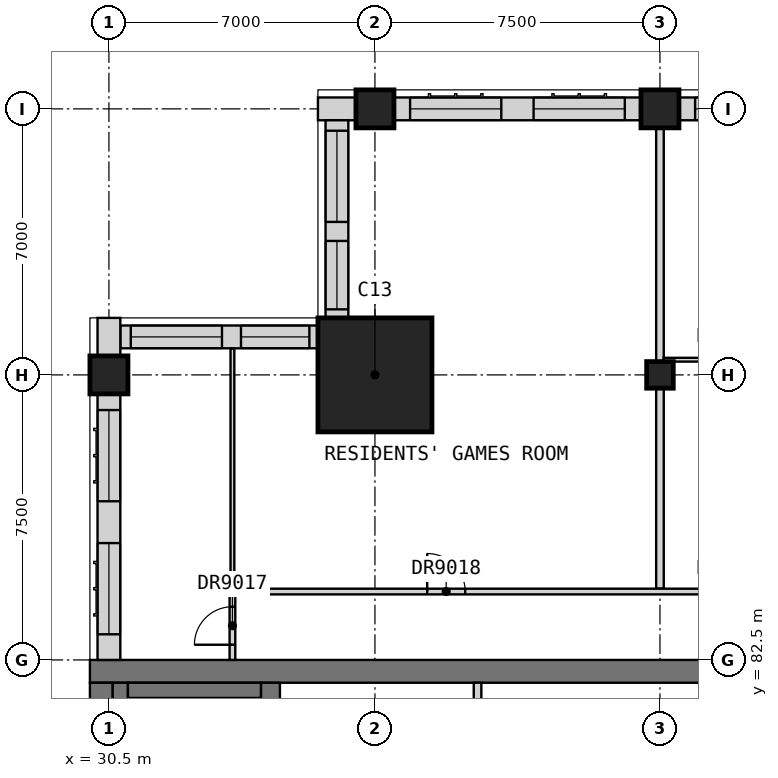
"""IFC4 building model, lengths in metres.
Left out: names, types, materials, properties, quantities, classifications, styles, units other than length and angle.
Written with IfcOpenShell. Run it as: python <this file> out.ifc"""

import sys

from ifc_helpers import new_model, si_unit, direction, frame, frame_2d, origin, origin_2d, place, context, subcontext, project, spatial, rectangle, extrude, element, fill, save


model = new_model("IFC4")
c1 = context("Model", 3, precision=1e-05, world=origin(), true_north=direction((0.0, 1.0)))
c2 = subcontext(c1, "Body", "Model", "MODEL_VIEW")
j1 = project(units=[si_unit("LENGTHUNIT", "METRE"), si_unit("PLANEANGLEUNIT", "RADIAN")], contexts=[c1])
p1 = place(None, origin())
s1 = spatial("IfcSite", under=j1, at=p1, CompositionType="ELEMENT")
p2 = place(p1, origin())
s2 = spatial("IfcBuilding", under=s1, at=p2, CompositionType="ELEMENT")
p3 = place(p2, frame((0.0, 0.0, 280.2)))
s3 = spatial("IfcBuildingStorey", under=s2, at=p3, CompositionType="ELEMENT", Elevation=280.2)
for number, where, z_axis, x_axis in (
    (1, (30.5, 90.0, 0.0), (0.0, 0.0, 1.0), (1.0, 0.0, 0.0)),
    (2, (37.5, 97.0, 0.0), (0.0, 0.0, 1.0), (1.0, 0.0, 0.0)),
):
    element("IfcColumn", number, at=place(p3, frame(where, z_axis=z_axis, x_axis=x_axis)), inside=s3, PredefinedType="COLUMN", context=c2, shape_type="SweptSolid", body=[
        extrude(rectangle(XDim=1.0, YDim=1.0, at=origin_2d()), origin(), (0.0, 0.0, 1.0), 3.5),
    ])
p4 = place(p3, frame((45.0, 90.0, 0.0), z_axis=(0.0, 0.0, 1.0), x_axis=(1.0, 0.0, 0.0)))
e3 = element("IfcColumn", 3, at=p4, inside=s3, PredefinedType="COLUMN", context=c2, shape_type="SweptSolid", body=[
    extrude(rectangle(XDim=0.7, YDim=0.7, at=origin_2d()), origin(), (0.0, 0.0, 1.0), 3.5),
])
p5 = place(p3, frame((45.0, 97.0, 0.0), z_axis=(0.0, 0.0, 1.0), x_axis=(1.0, 0.0, 0.0)))
e4 = element("IfcColumn", 4, at=p5, inside=s3, PredefinedType="COLUMN", context=c2, shape_type="SweptSolid", body=[
    extrude(rectangle(XDim=1.0, YDim=1.0, at=origin_2d()), origin(), (0.0, 0.0, 1.0), 3.5),
])
p6 = place(p3, frame((37.5, 90.0, 0.0), z_axis=(0.0, 0.0, 1.0), x_axis=(1.0, 0.0, 0.0)))
e5 = element("IfcColumn", 5, at=p6, inside=s3, PredefinedType="COLUMN", context=c2, shape_type="SweptSolid", body=[
    extrude(rectangle(XDim=3.0, YDim=3.0, at=origin_2d()), origin(), (0.0, 0.0, 1.0), 3.5),
])
p7 = place(p3, frame((30.0, 82.2, 0.0), z_axis=(0.0, 0.0, 1.0), x_axis=(1.0, 0.0, 0.0)))
e6 = element("IfcWall", 6, at=p7, inside=s3, PredefinedType="SHEAR", context=c2, shape_type="SweptSolid", body=[
    extrude(rectangle(XDim=30.0, YDim=0.6, at=frame_2d((15.0, 0.0))), origin(), (0.0, 0.0, 1.0), 3.5),
])
p8 = place(p3, frame((30.3, 60.6, 0.0), z_axis=(0.0, 0.0, 1.0), x_axis=(0.0, 1.0, 0.0)))
e7 = element("IfcWall", 7, at=p8, inside=s3, PredefinedType="SHEAR", context=c2, shape_type="SweptSolid", body=[
    extrude(rectangle(XDim=21.3, YDim=0.6, at=frame_2d((10.65, 0.0))), origin(), (0.0, 0.0, 1.0), 3.5),
])
p9 = place(p3, frame((34.75, 78.3, 0.0), z_axis=(0.0, 0.0, 1.0), x_axis=(0.0, 1.0, 0.0)))
e8 = element("IfcWall", 8, at=p9, inside=s3, PredefinedType="SHEAR", context=c2, shape_type="SweptSolid", body=[
    extrude(rectangle(XDim=3.6, YDim=0.5, at=frame_2d((1.8, 0.0))), origin(), (0.0, 0.0, 1.0), 3.5),
])
p10 = place(p3, frame((52.0, 97.0, 0.0), z_axis=(0.0, 0.0, 1.0), x_axis=(-1.0, 0.0, 0.0)))
e9 = element("IfcWall", 9, at=p10, inside=s3, PredefinedType="SOLIDWALL", context=c2, shape_type="SweptSolid", body=[
    extrude(rectangle(XDim=6.5, YDim=0.6, at=frame_2d((3.25, 0.0))), origin(), (0.0, 0.0, 1.0), 2.75),
])
p11 = place(p10, frame((3.675, 0.0, 0.8)))
e10 = element("IfcOpeningElement", 10, at=p11, cuts=e9, PredefinedType="OPENING", context=c2, shape_type="SweptSolid", body=[
    extrude(rectangle(XDim=2.4, YDim=1.8, at=frame_2d((1.2, 0.9))), frame((0.0, 0.31, 0.0), z_axis=(0.0, -1.0, 0.0), x_axis=(1.0, 0.0, 0.0)), (0.0, 0.0, 1.0), 0.62),
])
p12 = place(p10, frame((0.425, 0.0, 0.8)))
e11 = element("IfcOpeningElement", 11, at=p12, cuts=e9, PredefinedType="OPENING", context=c2, shape_type="SweptSolid", body=[
    extrude(rectangle(XDim=2.4, YDim=1.8, at=frame_2d((1.2, 0.9))), frame((0.0, 0.31, 0.0), z_axis=(0.0, -1.0, 0.0), x_axis=(1.0, 0.0, 0.0)), (0.0, 0.0, 1.0), 0.62),
])
p13 = place(p3, frame((44.5, 97.0, 0.0), z_axis=(0.0, 0.0, 1.0), x_axis=(-1.0, 0.0, 0.0)))
e12 = element("IfcWall", 12, at=p13, inside=s3, PredefinedType="SOLIDWALL", context=c2, shape_type="SweptSolid", body=[
    extrude(rectangle(XDim=6.5, YDim=0.6, at=frame_2d((3.25, 0.0))), origin(), (0.0, 0.0, 1.0), 2.75),
])
p14 = place(p13, frame((3.675, 0.0, 0.8)))
e13 = element("IfcOpeningElement", 13, at=p14, cuts=e12, PredefinedType="OPENING", context=c2, shape_type="SweptSolid", body=[
    extrude(rectangle(XDim=2.4, YDim=1.8, at=frame_2d((1.2, 0.9))), frame((0.0, 0.31, 0.0), z_axis=(0.0, -1.0, 0.0), x_axis=(1.0, 0.0, 0.0)), (0.0, 0.0, 1.0), 0.62),
])
p15 = place(p13, frame((0.425, 0.0, 0.8)))
e14 = element("IfcOpeningElement", 14, at=p15, cuts=e12, PredefinedType="OPENING", context=c2, shape_type="SweptSolid", body=[
    extrude(rectangle(XDim=2.4, YDim=1.8, at=frame_2d((1.2, 0.9))), frame((0.0, 0.31, 0.0), z_axis=(0.0, -1.0, 0.0), x_axis=(1.0, 0.0, 0.0)), (0.0, 0.0, 1.0), 0.62),
])
p16 = place(p3, frame((37.0, 97.0, 0.0), z_axis=(0.0, 0.0, 1.0), x_axis=(-1.0, 0.0, 0.0)))
e15 = element("IfcWall", 15, at=p16, inside=s3, PredefinedType="SOLIDWALL", context=c2, shape_type="SweptSolid", body=[
    extrude(rectangle(XDim=1.0, YDim=0.6, at=frame_2d((0.5, 0.0))), origin(), (0.0, 0.0, 1.0), 3.25),
])
p17 = place(p3, frame((36.5, 96.7, 0.0), z_axis=(0.0, 0.0, 1.0), x_axis=(0.0, -1.0, 0.0)))
e16 = element("IfcWall", 16, at=p17, inside=s3, PredefinedType="SOLIDWALL", context=c2, shape_type="SweptSolid", body=[
    extrude(rectangle(XDim=5.2, YDim=0.6, at=frame_2d((2.6, 0.0))), origin(), (0.0, 0.0, 1.0), 3.25),
])
p18 = place(p17, frame((3.175, 0.0, 0.8)))
e17 = element("IfcOpeningElement", 17, at=p18, cuts=e16, PredefinedType="OPENING", context=c2, shape_type="SweptSolid", body=[
    extrude(rectangle(XDim=1.8, YDim=1.8, at=frame_2d((0.9, 0.9))), frame((0.0, 0.31, 0.0), z_axis=(0.0, -1.0, 0.0), x_axis=(1.0, 0.0, 0.0)), (0.0, 0.0, 1.0), 0.62),
])
p19 = place(p17, frame((0.275, 0.0, 0.8)))
e18 = element("IfcOpeningElement", 18, at=p19, cuts=e16, PredefinedType="OPENING", context=c2, shape_type="SweptSolid", body=[
    extrude(rectangle(XDim=2.4, YDim=1.8, at=frame_2d((1.2, 0.9))), frame((0.0, 0.31, 0.0), z_axis=(0.0, -1.0, 0.0), x_axis=(1.0, 0.0, 0.0)), (0.0, 0.0, 1.0), 0.62),
])
p20 = place(p3, frame((36.0, 91.0, 0.0), z_axis=(0.0, 0.0, 1.0), x_axis=(-1.0, 0.0, 0.0)))
e19 = element("IfcWall", 19, at=p20, inside=s3, PredefinedType="SOLIDWALL", context=c2, shape_type="SweptSolid", body=[
    extrude(rectangle(XDim=5.2, YDim=0.6, at=frame_2d((2.6, 0.0))), origin(), (0.0, 0.0, 1.0), 3.25),
])
p21 = place(p20, frame((2.525, 0.0, 0.8)))
e20 = element("IfcOpeningElement", 20, at=p21, cuts=e19, PredefinedType="OPENING", context=c2, shape_type="SweptSolid", body=[
    extrude(rectangle(XDim=2.4, YDim=1.8, at=frame_2d((1.2, 0.9))), frame((0.0, 0.31, 0.0), z_axis=(0.0, -1.0, 0.0), x_axis=(1.0, 0.0, 0.0)), (0.0, 0.0, 1.0), 0.62),
])
p22 = place(p20, frame((0.225, 0.0, 0.8)))
e21 = element("IfcOpeningElement", 21, at=p22, cuts=e19, PredefinedType="OPENING", context=c2, shape_type="SweptSolid", body=[
    extrude(rectangle(XDim=1.8, YDim=1.8, at=frame_2d((0.9, 0.9))), frame((0.0, 0.31, 0.0), z_axis=(0.0, -1.0, 0.0), x_axis=(1.0, 0.0, 0.0)), (0.0, 0.0, 1.0), 0.62),
])
p23 = place(p3, frame((30.5, 91.5, 0.0), z_axis=(0.0, 0.0, 1.0), x_axis=(0.0, -1.0, 0.0)))
e22 = element("IfcWall", 22, at=p23, inside=s3, PredefinedType="SOLIDWALL", context=c2, shape_type="SweptSolid", body=[
    extrude(rectangle(XDim=1.0, YDim=0.6, at=frame_2d((0.5, 0.0))), origin(), (0.0, 0.0, 1.0), 3.25),
])
p24 = place(p3, frame((30.5, 89.5, 0.0), z_axis=(0.0, 0.0, 1.0), x_axis=(0.0, -1.0, 0.0)))
e23 = element("IfcWall", 23, at=p24, inside=s3, PredefinedType="SOLIDWALL", context=c2, shape_type="SweptSolid", body=[
    extrude(rectangle(XDim=7.0, YDim=0.6, at=frame_2d((3.5, 0.0))), origin(), (0.0, 0.0, 1.0), 3.25),
])
p25 = place(p24, frame((3.925, 0.0, 0.8)))
e24 = element("IfcOpeningElement", 24, at=p25, cuts=e23, PredefinedType="OPENING", context=c2, shape_type="SweptSolid", body=[
    extrude(rectangle(XDim=2.4, YDim=1.8, at=frame_2d((1.2, 0.9))), frame((0.0, 0.31, 0.0), z_axis=(0.0, -1.0, 0.0), x_axis=(1.0, 0.0, 0.0)), (0.0, 0.0, 1.0), 0.62),
])
p26 = place(p24, frame((0.425, 0.0, 0.8)))
e25 = element("IfcOpeningElement", 25, at=p26, cuts=e23, PredefinedType="OPENING", context=c2, shape_type="SweptSolid", body=[
    extrude(rectangle(XDim=2.4, YDim=1.8, at=frame_2d((1.2, 0.9))), frame((0.0, 0.31, 0.0), z_axis=(0.0, -1.0, 0.0), x_axis=(1.0, 0.0, 0.0)), (0.0, 0.0, 1.0), 0.62),
])
p27 = place(p3, frame((40.2, 78.5, 0.0), z_axis=(0.0, 0.0, 1.0), x_axis=(0.0, 1.0, 0.0)))
e26 = element("IfcWall", 26, at=p27, inside=s3, PredefinedType="SOLIDWALL", context=c2, shape_type="SweptSolid", body=[
    extrude(rectangle(XDim=3.4, YDim=0.2, at=frame_2d((1.7, 0.0))), origin(), (0.0, 0.0, 1.0), 3.5),
])
p28 = place(p3, frame((30.8, 60.6, 0.0), z_axis=(0.0, 0.0, 1.0), x_axis=(0.0, 1.0, 0.0)))
e27 = element("IfcWall", 27, at=p28, inside=s3, PredefinedType="SOLIDWALL", context=c2, shape_type="SweptSolid", body=[
    extrude(rectangle(XDim=21.3, YDim=0.4, at=frame_2d((10.65, 0.0))), origin(), (0.0, 0.0, 1.0), 3.25),
])
p29 = place(p3, frame((31.0, 81.7, 0.0), z_axis=(0.0, 0.0, 1.0), x_axis=(1.0, 0.0, 0.0)))
e28 = element("IfcWall", 28, at=p29, inside=s3, PredefinedType="SOLIDWALL", context=c2, shape_type="SweptSolid", body=[
    extrude(rectangle(XDim=3.5, YDim=0.4, at=frame_2d((1.75, 0.0))), origin(), (0.0, 0.0, 1.0), 3.25),
])
p30 = place(p3, frame((45.0, 84.375, 0.0), z_axis=(0.0, 0.0, 1.0), x_axis=(0.0, 1.0, 0.0)))
e29 = element("IfcWall", 29, at=p30, inside=s3, PredefinedType="PARTITIONING", context=c2, shape_type="SweptSolid", body=[
    extrude(rectangle(XDim=13.125, YDim=0.2, at=frame_2d((6.562, 0.0))), origin(), (0.0, 0.0, 1.0), 3.25),
])
p31 = place(p3, frame((33.75, 84.3, 0.0), z_axis=(0.0, 0.0, 1.0), x_axis=(1.0, 0.0, 0.0)))
e30 = element("IfcWall", 30, at=p31, inside=s3, PredefinedType="PARTITIONING", context=c2, shape_type="SweptSolid", body=[
    extrude(rectangle(XDim=28.05, YDim=0.15, at=frame_2d((14.025, 0.0))), origin(), (0.0, 0.0, 1.0), 3.25),
])
p32 = place(p31, frame((5.125, 0.0, 0.0)))
e31 = element("IfcOpeningElement", 31, at=p32, cuts=e30, PredefinedType="OPENING", context=c2, shape_type="SweptSolid", body=[
    extrude(rectangle(XDim=1.0, YDim=2.1, at=frame_2d((0.5, 1.05))), frame((0.0, 0.085, 0.0), z_axis=(0.0, -1.0, 0.0), x_axis=(1.0, 0.0, 0.0)), (0.0, 0.0, 1.0), 0.17),
])
p33 = place(p31, frame((12.675, 0.0, 0.0)))
e32 = element("IfcOpeningElement", 32, at=p33, cuts=e30, PredefinedType="OPENING", context=c2, shape_type="SweptSolid", body=[
    extrude(rectangle(XDim=0.9, YDim=2.1, at=frame_2d((0.45, 1.05))), frame((0.0, 0.085, 0.0), z_axis=(0.0, -1.0, 0.0), x_axis=(1.0, 0.0, 0.0)), (0.0, 0.0, 1.0), 0.17),
])
p34 = place(p31, frame((26.65, 0.0, 0.0)))
e33 = element("IfcOpeningElement", 33, at=p34, cuts=e30, PredefinedType="OPENING", context=c2, shape_type="SweptSolid", body=[
    extrude(rectangle(XDim=1.0, YDim=2.1, at=frame_2d((0.5, 1.05))), frame((0.0, 0.085, 0.0), z_axis=(0.0, -1.0, 0.0), x_axis=(1.0, 0.0, 0.0)), (0.0, 0.0, 1.0), 0.17),
])
p35 = place(p3, frame((33.75, 82.5, 0.0), z_axis=(0.0, 0.0, 1.0), x_axis=(0.0, 1.0, 0.0)))
e34 = element("IfcWall", 34, at=p35, inside=s3, PredefinedType="PARTITIONING", context=c2, shape_type="SweptSolid", body=[
    extrude(rectangle(XDim=1.725, YDim=0.15, at=frame_2d((0.863, 0.0))), origin(), (0.0, 0.0, 1.0), 3.25),
])
p36 = place(p35, frame((0.4, 0.0, 0.0)))
e35 = element("IfcOpeningElement", 35, at=p36, cuts=e34, PredefinedType="OPENING", context=c2, shape_type="SweptSolid", body=[
    extrude(rectangle(XDim=1.0, YDim=2.1, at=frame_2d((0.5, 1.05))), frame((0.0, 0.085, 0.0), z_axis=(0.0, -1.0, 0.0), x_axis=(1.0, 0.0, 0.0)), (0.0, 0.0, 1.0), 0.17),
])
p37 = place(p3, frame((45.1, 90.4, 0.0), z_axis=(0.0, 0.0, 1.0), x_axis=(1.0, 0.0, 0.0)))
e36 = element("IfcWall", 36, at=p37, inside=s3, PredefinedType="PARTITIONING", context=c2, shape_type="SweptSolid", body=[
    extrude(rectangle(XDim=14.8, YDim=0.1, at=frame_2d((7.4, 0.0))), origin(), (0.0, 0.0, 1.0), 3.25),
])
p38 = place(p37, frame((1.325, 0.0, 0.0)))
e37 = element("IfcOpeningElement", 37, at=p38, cuts=e36, PredefinedType="OPENING", context=c2, shape_type="SweptSolid", body=[
    extrude(rectangle(XDim=0.9, YDim=2.1, at=frame_2d((0.45, 1.05))), frame((0.0, 0.06, 0.0), z_axis=(0.0, -1.0, 0.0), x_axis=(1.0, 0.0, 0.0)), (0.0, 0.0, 1.0), 0.12),
])
p39 = place(p37, frame((8.825, 0.0, 0.0)))
e38 = element("IfcOpeningElement", 38, at=p39, cuts=e36, PredefinedType="OPENING", context=c2, shape_type="SweptSolid", body=[
    extrude(rectangle(XDim=0.9, YDim=2.1, at=frame_2d((0.45, 1.05))), frame((0.0, 0.06, 0.0), z_axis=(0.0, -1.0, 0.0), x_axis=(1.0, 0.0, 0.0)), (0.0, 0.0, 1.0), 0.12),
])
p40 = place(p37, frame((12.575, 0.0, 0.0)))
e39 = element("IfcOpeningElement", 39, at=p40, cuts=e36, PredefinedType="OPENING", context=c2, shape_type="SweptSolid", body=[
    extrude(rectangle(XDim=0.9, YDim=2.1, at=frame_2d((0.45, 1.05))), frame((0.0, 0.06, 0.0), z_axis=(0.0, -1.0, 0.0), x_axis=(1.0, 0.0, 0.0)), (0.0, 0.0, 1.0), 0.12),
])
p41 = place(p3, frame((33.75, 84.375, 0.0), z_axis=(0.0, 0.0, 1.0), x_axis=(0.0, 1.0, 0.0)))
e40 = element("IfcWall", 40, at=p41, inside=s3, PredefinedType="PARTITIONING", context=c2, shape_type="SweptSolid", body=[
    extrude(rectangle(XDim=6.315, YDim=0.1, at=frame_2d((3.157, 0.0))), origin(), (0.0, 0.0, 1.0), 3.25),
])
p42 = place(p11, origin())
e41 = element("IfcWindow", 41, at=p42, inside=s3, PartitioningType="SINGLE_PANEL", PredefinedType="WINDOW", context=c2, shape_type="SweptSolid", body=[
    extrude(rectangle(XDim=2.4, YDim=1.8, at=frame_2d((1.2, 0.9))), frame((0.0, -0.07, 0.0), z_axis=(0.0, -1.0, 0.0), x_axis=(1.0, 0.0, 0.0)), (0.0, 0.0, 1.0), 0.06),
])
fill(e10, e41)
p43 = place(p14, origin())
e42 = element("IfcWindow", 42, at=p43, inside=s3, PartitioningType="SINGLE_PANEL", PredefinedType="WINDOW", context=c2, shape_type="SweptSolid", body=[
    extrude(rectangle(XDim=2.4, YDim=1.8, at=frame_2d((1.2, 0.9))), frame((0.0, -0.07, 0.0), z_axis=(0.0, -1.0, 0.0), x_axis=(1.0, 0.0, 0.0)), (0.0, 0.0, 1.0), 0.06),
])
fill(e13, e42)
p44 = place(p15, origin())
e43 = element("IfcWindow", 43, at=p44, inside=s3, PartitioningType="SINGLE_PANEL", PredefinedType="WINDOW", context=c2, shape_type="SweptSolid", body=[
    extrude(rectangle(XDim=2.4, YDim=1.8, at=frame_2d((1.2, 0.9))), frame((0.0, -0.07, 0.0), z_axis=(0.0, -1.0, 0.0), x_axis=(1.0, 0.0, 0.0)), (0.0, 0.0, 1.0), 0.06),
])
fill(e14, e43)
p45 = place(p18, origin())
e44 = element("IfcWindow", 44, at=p45, inside=s3, PartitioningType="SINGLE_PANEL", PredefinedType="WINDOW", context=c2, shape_type="SweptSolid", body=[
    extrude(rectangle(XDim=1.8, YDim=1.8, at=frame_2d((0.9, 0.9))), frame((0.0, -0.07, 0.0), z_axis=(0.0, -1.0, 0.0), x_axis=(1.0, 0.0, 0.0)), (0.0, 0.0, 1.0), 0.06),
])
fill(e17, e44)
p46 = place(p19, origin())
e45 = element("IfcWindow", 45, at=p46, inside=s3, PartitioningType="SINGLE_PANEL", PredefinedType="WINDOW", context=c2, shape_type="SweptSolid", body=[
    extrude(rectangle(XDim=2.4, YDim=1.8, at=frame_2d((1.2, 0.9))), frame((0.0, -0.07, 0.0), z_axis=(0.0, -1.0, 0.0), x_axis=(1.0, 0.0, 0.0)), (0.0, 0.0, 1.0), 0.06),
])
fill(e18, e45)
p47 = place(p21, origin())
e46 = element("IfcWindow", 46, at=p47, inside=s3, PartitioningType="SINGLE_PANEL", PredefinedType="WINDOW", context=c2, shape_type="SweptSolid", body=[
    extrude(rectangle(XDim=2.4, YDim=1.8, at=frame_2d((1.2, 0.9))), frame((0.0, -0.07, 0.0), z_axis=(0.0, -1.0, 0.0), x_axis=(1.0, 0.0, 0.0)), (0.0, 0.0, 1.0), 0.06),
])
fill(e20, e46)
p48 = place(p22, origin())
e47 = element("IfcWindow", 47, at=p48, inside=s3, PartitioningType="SINGLE_PANEL", PredefinedType="WINDOW", context=c2, shape_type="SweptSolid", body=[
    extrude(rectangle(XDim=1.8, YDim=1.8, at=frame_2d((0.9, 0.9))), frame((0.0, -0.07, 0.0), z_axis=(0.0, -1.0, 0.0), x_axis=(1.0, 0.0, 0.0)), (0.0, 0.0, 1.0), 0.06),
])
fill(e21, e47)
p49 = place(p25, origin())
e48 = element("IfcWindow", 48, at=p49, inside=s3, PartitioningType="SINGLE_PANEL", PredefinedType="WINDOW", context=c2, shape_type="SweptSolid", body=[
    extrude(rectangle(XDim=2.4, YDim=1.8, at=frame_2d((1.2, 0.9))), frame((0.0, -0.07, 0.0), z_axis=(0.0, -1.0, 0.0), x_axis=(1.0, 0.0, 0.0)), (0.0, 0.0, 1.0), 0.06),
])
fill(e24, e48)
p50 = place(p26, origin())
e49 = element("IfcWindow", 49, at=p50, inside=s3, PartitioningType="SINGLE_PANEL", PredefinedType="WINDOW", context=c2, shape_type="SweptSolid", body=[
    extrude(rectangle(XDim=2.4, YDim=1.8, at=frame_2d((1.2, 0.9))), frame((0.0, -0.07, 0.0), z_axis=(0.0, -1.0, 0.0), x_axis=(1.0, 0.0, 0.0)), (0.0, 0.0, 1.0), 0.06),
])
fill(e25, e49)
p51 = place(p36, origin())
e50 = element("IfcDoor", 50, at=p51, inside=s3, OperationType="SINGLE_SWING_LEFT", PredefinedType="DOOR", context=c2, shape_type="SweptSolid", body=[
    extrude(rectangle(XDim=1.0, YDim=2.1, at=frame_2d((0.5, 1.05))), frame((0.0, 0.025, 0.0), z_axis=(0.0, -1.0, 0.0), x_axis=(1.0, 0.0, 0.0)), (0.0, 0.0, 1.0), 0.05),
])
fill(e35, e50)
p52 = place(p32, origin())
e51 = element("IfcDoor", 51, at=p52, inside=s3, OperationType="SINGLE_SWING_LEFT", PredefinedType="DOOR", context=c2, shape_type="SweptSolid", body=[
    extrude(rectangle(XDim=1.0, YDim=2.1, at=frame_2d((0.5, 1.05))), frame((0.0, 0.025, 0.0), z_axis=(0.0, -1.0, 0.0), x_axis=(1.0, 0.0, 0.0)), (0.0, 0.0, 1.0), 0.05),
])
fill(e31, e51)
save(model, sys.argv[1])
